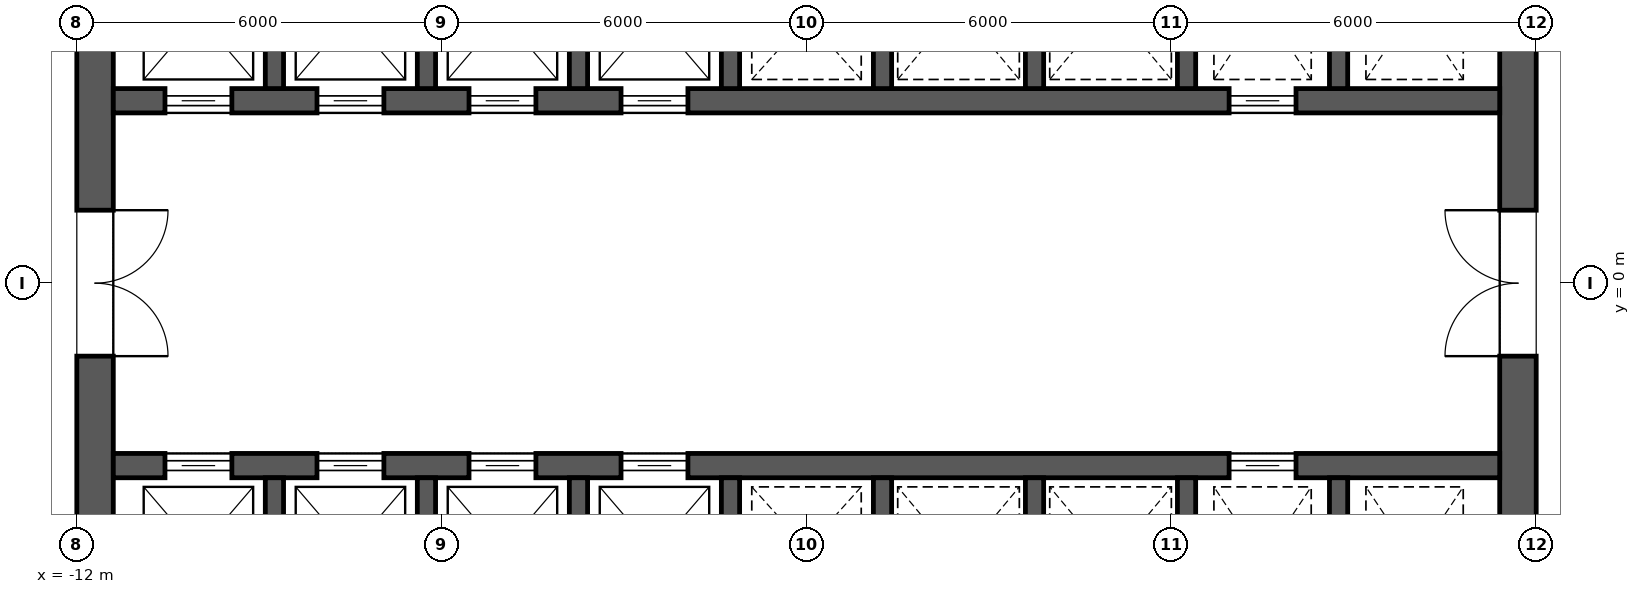
"""IFC4 building model, lengths in metres.
Left out: names, types, materials, properties, quantities, classifications, styles, units other than length and angle.
Written with IfcOpenShell. Run it as: python <this file> out.ifc"""

import sys

from ifc_helpers import new_model, si_unit, direction, frame, frame_2d, origin, place, context, subcontext, project, spatial, rectangle, extrude, element, fill, save


model = new_model("IFC4")
c1 = context("Model", 3, precision=1e-05, world=origin(), true_north=direction((0.0, 1.0)))
c2 = subcontext(c1, "Body", "Model", "MODEL_VIEW")
j1 = project(units=[si_unit("LENGTHUNIT", "METRE"), si_unit("PLANEANGLEUNIT", "RADIAN")], contexts=[c1])
p1 = place(None, origin())
s1 = spatial("IfcSite", under=j1, at=p1, CompositionType="ELEMENT")
p2 = place(p1, origin())
s2 = spatial("IfcBuilding", under=s1, at=p2, CompositionType="ELEMENT")
p3 = place(p2, frame((0.0, 0.0, 27.7)))
s3 = spatial("IfcBuildingStorey", under=s2, at=p3, CompositionType="ELEMENT", Elevation=27.7)
p4 = place(p3, frame((11.7, -11.4, 0.0), z_axis=(0.0, 0.0, 1.0), x_axis=(0.0, 1.0, 0.0)))
e1 = element("IfcWall", 1, at=p4, inside=s3, PredefinedType="SHEAR", context=c2, shape_type="SweptSolid", body=[
    extrude(rectangle(XDim=22.8, YDim=0.6, at=frame_2d((11.4, 0.0))), origin(), (0.0, 0.0, 1.0), 4.2),
])
p5 = place(p4, frame((10.2, 0.0, 0.0)))
e2 = element("IfcOpeningElement", 2, at=p5, cuts=e1, PredefinedType="OPENING", context=c2, shape_type="SweptSolid", body=[
    extrude(rectangle(XDim=2.4, YDim=2.1, at=frame_2d((1.2, 1.05))), frame((0.0, 0.312, 0.0), z_axis=(0.0, -1.0, 0.0), x_axis=(1.0, 0.0, 0.0)), (0.0, 0.0, 1.0), 0.624),
])
p6 = place(p4, frame((19.5, 0.0, 0.0)))
e3 = element("IfcOpeningElement", 3, at=p6, cuts=e1, PredefinedType="OPENING", context=c2, shape_type="SweptSolid", body=[
    extrude(rectangle(XDim=1.2, YDim=2.1, at=frame_2d((0.6, 1.05))), frame((0.0, 0.312, 0.0), z_axis=(0.0, -1.0, 0.0), x_axis=(1.0, 0.0, 0.0)), (0.0, 0.0, 1.0), 0.624),
])
p7 = place(p4, frame((2.1, 0.0, 0.0)))
e4 = element("IfcOpeningElement", 4, at=p7, cuts=e1, PredefinedType="OPENING", context=c2, shape_type="SweptSolid", body=[
    extrude(rectangle(XDim=1.2, YDim=2.1, at=frame_2d((0.6, 1.05))), frame((0.0, 0.312, 0.0), z_axis=(0.0, -1.0, 0.0), x_axis=(1.0, 0.0, 0.0)), (0.0, 0.0, 1.0), 0.624),
])
p8 = place(p3, frame((-11.7, -11.4, 0.0), z_axis=(0.0, 0.0, 1.0), x_axis=(0.0, 1.0, 0.0)))
e5 = element("IfcWall", 5, at=p8, inside=s3, PredefinedType="SHEAR", context=c2, shape_type="SweptSolid", body=[
    extrude(rectangle(XDim=22.8, YDim=0.6, at=frame_2d((11.4, 0.0))), origin(), (0.0, 0.0, 1.0), 4.2),
])
p9 = place(p8, frame((10.2, 0.0, 0.0)))
e6 = element("IfcOpeningElement", 6, at=p9, cuts=e5, PredefinedType="OPENING", context=c2, shape_type="SweptSolid", body=[
    extrude(rectangle(XDim=2.4, YDim=2.1, at=frame_2d((1.2, 1.05))), frame((0.0, 0.312, 0.0), z_axis=(0.0, -1.0, 0.0), x_axis=(1.0, 0.0, 0.0)), (0.0, 0.0, 1.0), 0.624),
])
p10 = place(p8, frame((18.925, 0.0, 0.0)))
e7 = element("IfcOpeningElement", 7, at=p10, cuts=e5, PredefinedType="OPENING", context=c2, shape_type="SweptSolid", body=[
    extrude(rectangle(XDim=1.2, YDim=2.1, at=frame_2d((0.6, 1.05))), frame((0.0, 0.312, 0.0), z_axis=(0.0, -1.0, 0.0), x_axis=(1.0, 0.0, 0.0)), (0.0, 0.0, 1.0), 0.624),
])
p11 = place(p8, frame((2.675, 0.0, 0.0)))
e8 = element("IfcOpeningElement", 8, at=p11, cuts=e5, PredefinedType="OPENING", context=c2, shape_type="SweptSolid", body=[
    extrude(rectangle(XDim=1.2, YDim=2.1, at=frame_2d((0.6, 1.05))), frame((0.0, 0.312, 0.0), z_axis=(0.0, -1.0, 0.0), x_axis=(1.0, 0.0, 0.0)), (0.0, 0.0, 1.0), 0.624),
])
p12 = place(p3, frame((-11.4, 3.0, 0.0), z_axis=(0.0, 0.0, 1.0), x_axis=(1.0, 0.0, 0.0)))
e9 = element("IfcWall", 9, at=p12, inside=s3, PredefinedType="SHEAR", context=c2, shape_type="SweptSolid", body=[
    extrude(rectangle(XDim=22.8, YDim=0.4, at=frame_2d((11.4, 0.0))), origin(), (0.0, 0.0, 1.0), 4.2),
])
p13 = place(p12, frame((0.85, 0.0, 0.0)))
e10 = element("IfcOpeningElement", 10, at=p13, cuts=e9, PredefinedType="OPENING", context=c2, shape_type="SweptSolid", body=[
    extrude(rectangle(XDim=1.1, YDim=2.1, at=frame_2d((0.55, 1.05))), frame((0.0, 0.212, 0.0), z_axis=(0.0, -1.0, 0.0), x_axis=(1.0, 0.0, 0.0)), (0.0, 0.0, 1.0), 0.424),
])
p14 = place(p12, frame((3.35, 0.0, 0.0)))
e11 = element("IfcOpeningElement", 11, at=p14, cuts=e9, PredefinedType="OPENING", context=c2, shape_type="SweptSolid", body=[
    extrude(rectangle(XDim=1.1, YDim=2.1, at=frame_2d((0.55, 1.05))), frame((0.0, 0.212, 0.0), z_axis=(0.0, -1.0, 0.0), x_axis=(1.0, 0.0, 0.0)), (0.0, 0.0, 1.0), 0.424),
])
p15 = place(p12, frame((5.85, 0.0, 0.0)))
e12 = element("IfcOpeningElement", 12, at=p15, cuts=e9, PredefinedType="OPENING", context=c2, shape_type="SweptSolid", body=[
    extrude(rectangle(XDim=1.1, YDim=2.1, at=frame_2d((0.55, 1.05))), frame((0.0, 0.212, 0.0), z_axis=(0.0, -1.0, 0.0), x_axis=(1.0, 0.0, 0.0)), (0.0, 0.0, 1.0), 0.424),
])
p16 = place(p12, frame((8.35, 0.0, 0.0)))
e13 = element("IfcOpeningElement", 13, at=p16, cuts=e9, PredefinedType="OPENING", context=c2, shape_type="SweptSolid", body=[
    extrude(rectangle(XDim=1.1, YDim=2.1, at=frame_2d((0.55, 1.05))), frame((0.0, 0.212, 0.0), z_axis=(0.0, -1.0, 0.0), x_axis=(1.0, 0.0, 0.0)), (0.0, 0.0, 1.0), 0.424),
])
p17 = place(p12, frame((18.35, 0.0, 0.0)))
e14 = element("IfcOpeningElement", 14, at=p17, cuts=e9, PredefinedType="OPENING", context=c2, shape_type="SweptSolid", body=[
    extrude(rectangle(XDim=1.1, YDim=2.1, at=frame_2d((0.55, 1.05))), frame((0.0, 0.212, 0.0), z_axis=(0.0, -1.0, 0.0), x_axis=(1.0, 0.0, 0.0)), (0.0, 0.0, 1.0), 0.424),
])
for number, where, z_axis, x_axis in (
    (15, (-8.75, 3.2, 0.0), (0.0, 0.0, 1.0), (0.0, 1.0, 0.0)),
    (16, (-6.25, 3.2, 0.0), (0.0, 0.0, 1.0), (0.0, 1.0, 0.0)),
    (17, (-3.75, 3.2, 0.0), (0.0, 0.0, 1.0), (0.0, 1.0, 0.0)),
    (18, (-1.25, 3.2, 0.0), (0.0, 0.0, 1.0), (0.0, 1.0, 0.0)),
    (19, (1.25, 3.2, 0.0), (0.0, 0.0, 1.0), (0.0, 1.0, 0.0)),
    (20, (3.75, 3.2, 0.0), (0.0, 0.0, 1.0), (0.0, 1.0, 0.0)),
    (21, (6.25, 3.2, 0.0), (0.0, 0.0, 1.0), (0.0, 1.0, 0.0)),
    (22, (8.75, 3.2, 0.0), (0.0, 0.0, 1.0), (0.0, 1.0, 0.0)),
):
    element("IfcWall", number, at=place(p3, frame(where, z_axis=z_axis, x_axis=x_axis)), inside=s3, PredefinedType="SHEAR", context=c2, shape_type="SweptSolid", body=[
        extrude(rectangle(XDim=2.9, YDim=0.3, at=frame_2d((1.45, 0.0))), origin(), (0.0, 0.0, 1.0), 4.2),
    ])
p18 = place(p3, frame((-11.4, -3.0, 0.0), z_axis=(0.0, 0.0, 1.0), x_axis=(1.0, 0.0, 0.0)))
e23 = element("IfcWall", 23, at=p18, inside=s3, PredefinedType="SHEAR", context=c2, shape_type="SweptSolid", body=[
    extrude(rectangle(XDim=22.8, YDim=0.4, at=frame_2d((11.4, 0.0))), origin(), (0.0, 0.0, 1.0), 4.2),
])
p19 = place(p18, frame((0.85, 0.0, 0.0)))
e24 = element("IfcOpeningElement", 24, at=p19, cuts=e23, PredefinedType="OPENING", context=c2, shape_type="SweptSolid", body=[
    extrude(rectangle(XDim=1.1, YDim=2.1, at=frame_2d((0.55, 1.05))), frame((0.0, 0.212, 0.0), z_axis=(0.0, -1.0, 0.0), x_axis=(1.0, 0.0, 0.0)), (0.0, 0.0, 1.0), 0.424),
])
p20 = place(p18, frame((3.35, 0.0, 0.0)))
e25 = element("IfcOpeningElement", 25, at=p20, cuts=e23, PredefinedType="OPENING", context=c2, shape_type="SweptSolid", body=[
    extrude(rectangle(XDim=1.1, YDim=2.1, at=frame_2d((0.55, 1.05))), frame((0.0, 0.212, 0.0), z_axis=(0.0, -1.0, 0.0), x_axis=(1.0, 0.0, 0.0)), (0.0, 0.0, 1.0), 0.424),
])
p21 = place(p18, frame((5.85, 0.0, 0.0)))
e26 = element("IfcOpeningElement", 26, at=p21, cuts=e23, PredefinedType="OPENING", context=c2, shape_type="SweptSolid", body=[
    extrude(rectangle(XDim=1.1, YDim=2.1, at=frame_2d((0.55, 1.05))), frame((0.0, 0.212, 0.0), z_axis=(0.0, -1.0, 0.0), x_axis=(1.0, 0.0, 0.0)), (0.0, 0.0, 1.0), 0.424),
])
p22 = place(p18, frame((8.35, 0.0, 0.0)))
e27 = element("IfcOpeningElement", 27, at=p22, cuts=e23, PredefinedType="OPENING", context=c2, shape_type="SweptSolid", body=[
    extrude(rectangle(XDim=1.1, YDim=2.1, at=frame_2d((0.55, 1.05))), frame((0.0, 0.212, 0.0), z_axis=(0.0, -1.0, 0.0), x_axis=(1.0, 0.0, 0.0)), (0.0, 0.0, 1.0), 0.424),
])
p23 = place(p18, frame((18.35, 0.0, 0.0)))
e28 = element("IfcOpeningElement", 28, at=p23, cuts=e23, PredefinedType="OPENING", context=c2, shape_type="SweptSolid", body=[
    extrude(rectangle(XDim=1.1, YDim=2.1, at=frame_2d((0.55, 1.05))), frame((0.0, 0.212, 0.0), z_axis=(0.0, -1.0, 0.0), x_axis=(1.0, 0.0, 0.0)), (0.0, 0.0, 1.0), 0.424),
])
for number, where, z_axis, x_axis in (
    (29, (-8.75, -6.1, 0.0), (0.0, 0.0, 1.0), (0.0, 1.0, 0.0)),
    (30, (-6.25, -6.1, 0.0), (0.0, 0.0, 1.0), (0.0, 1.0, 0.0)),
    (31, (-3.75, -6.1, 0.0), (0.0, 0.0, 1.0), (0.0, 1.0, 0.0)),
    (32, (-1.25, -6.1, 0.0), (0.0, 0.0, 1.0), (0.0, 1.0, 0.0)),
    (33, (1.25, -6.1, 0.0), (0.0, 0.0, 1.0), (0.0, 1.0, 0.0)),
    (34, (3.75, -6.1, 0.0), (0.0, 0.0, 1.0), (0.0, 1.0, 0.0)),
    (35, (6.25, -6.1, 0.0), (0.0, 0.0, 1.0), (0.0, 1.0, 0.0)),
    (36, (8.75, -6.1, 0.0), (0.0, 0.0, 1.0), (0.0, 1.0, 0.0)),
):
    element("IfcWall", number, at=place(p3, frame(where, z_axis=z_axis, x_axis=x_axis)), inside=s3, PredefinedType="SHEAR", context=c2, shape_type="SweptSolid", body=[
        extrude(rectangle(XDim=2.9, YDim=0.3, at=frame_2d((1.45, 0.0))), origin(), (0.0, 0.0, 1.0), 4.2),
    ])
p24 = place(p13, origin())
e37 = element("IfcDoor", 37, at=p24, inside=s3, OperationType="SLIDING_TO_LEFT", PredefinedType="DOOR", context=c2, shape_type="SweptSolid", body=[
    extrude(rectangle(XDim=1.1, YDim=2.1, at=frame_2d((0.55, 1.05))), frame((0.0, 0.025, 0.0), z_axis=(0.0, -1.0, 0.0), x_axis=(1.0, 0.0, 0.0)), (0.0, 0.0, 1.0), 0.05),
])
fill(e10, e37)
p25 = place(p14, origin())
e38 = element("IfcDoor", 38, at=p25, inside=s3, OperationType="SLIDING_TO_LEFT", PredefinedType="DOOR", context=c2, shape_type="SweptSolid", body=[
    extrude(rectangle(XDim=1.1, YDim=2.1, at=frame_2d((0.55, 1.05))), frame((0.0, 0.025, 0.0), z_axis=(0.0, -1.0, 0.0), x_axis=(1.0, 0.0, 0.0)), (0.0, 0.0, 1.0), 0.05),
])
fill(e11, e38)
p26 = place(p15, origin())
e39 = element("IfcDoor", 39, at=p26, inside=s3, OperationType="SLIDING_TO_LEFT", PredefinedType="DOOR", context=c2, shape_type="SweptSolid", body=[
    extrude(rectangle(XDim=1.1, YDim=2.1, at=frame_2d((0.55, 1.05))), frame((0.0, 0.025, 0.0), z_axis=(0.0, -1.0, 0.0), x_axis=(1.0, 0.0, 0.0)), (0.0, 0.0, 1.0), 0.05),
])
fill(e12, e39)
p27 = place(p16, origin())
e40 = element("IfcDoor", 40, at=p27, inside=s3, OperationType="SLIDING_TO_LEFT", PredefinedType="DOOR", context=c2, shape_type="SweptSolid", body=[
    extrude(rectangle(XDim=1.1, YDim=2.1, at=frame_2d((0.55, 1.05))), frame((0.0, 0.025, 0.0), z_axis=(0.0, -1.0, 0.0), x_axis=(1.0, 0.0, 0.0)), (0.0, 0.0, 1.0), 0.05),
])
fill(e13, e40)
p28 = place(p19, origin())
e41 = element("IfcDoor", 41, at=p28, inside=s3, OperationType="SLIDING_TO_LEFT", PredefinedType="DOOR", context=c2, shape_type="SweptSolid", body=[
    extrude(rectangle(XDim=1.1, YDim=2.1, at=frame_2d((0.55, 1.05))), frame((0.0, 0.025, 0.0), z_axis=(0.0, -1.0, 0.0), x_axis=(1.0, 0.0, 0.0)), (0.0, 0.0, 1.0), 0.05),
])
fill(e24, e41)
p29 = place(p20, origin())
e42 = element("IfcDoor", 42, at=p29, inside=s3, OperationType="SLIDING_TO_LEFT", PredefinedType="DOOR", context=c2, shape_type="SweptSolid", body=[
    extrude(rectangle(XDim=1.1, YDim=2.1, at=frame_2d((0.55, 1.05))), frame((0.0, 0.025, 0.0), z_axis=(0.0, -1.0, 0.0), x_axis=(1.0, 0.0, 0.0)), (0.0, 0.0, 1.0), 0.05),
])
fill(e25, e42)
p30 = place(p21, origin())
e43 = element("IfcDoor", 43, at=p30, inside=s3, OperationType="SLIDING_TO_LEFT", PredefinedType="DOOR", context=c2, shape_type="SweptSolid", body=[
    extrude(rectangle(XDim=1.1, YDim=2.1, at=frame_2d((0.55, 1.05))), frame((0.0, 0.025, 0.0), z_axis=(0.0, -1.0, 0.0), x_axis=(1.0, 0.0, 0.0)), (0.0, 0.0, 1.0), 0.05),
])
fill(e26, e43)
p31 = place(p22, origin())
e44 = element("IfcDoor", 44, at=p31, inside=s3, OperationType="SLIDING_TO_LEFT", PredefinedType="DOOR", context=c2, shape_type="SweptSolid", body=[
    extrude(rectangle(XDim=1.1, YDim=2.1, at=frame_2d((0.55, 1.05))), frame((0.0, 0.025, 0.0), z_axis=(0.0, -1.0, 0.0), x_axis=(1.0, 0.0, 0.0)), (0.0, 0.0, 1.0), 0.05),
])
fill(e27, e44)
p32 = place(p17, origin())
e45 = element("IfcDoor", 45, at=p32, inside=s3, OperationType="SLIDING_TO_LEFT", PredefinedType="DOOR", context=c2, shape_type="SweptSolid", body=[
    extrude(rectangle(XDim=1.1, YDim=2.1, at=frame_2d((0.55, 1.05))), frame((0.0, 0.025, 0.0), z_axis=(0.0, -1.0, 0.0), x_axis=(1.0, 0.0, 0.0)), (0.0, 0.0, 1.0), 0.05),
])
fill(e14, e45)
p33 = place(p23, origin())
e46 = element("IfcDoor", 46, at=p33, inside=s3, OperationType="SLIDING_TO_LEFT", PredefinedType="DOOR", context=c2, shape_type="SweptSolid", body=[
    extrude(rectangle(XDim=1.1, YDim=2.1, at=frame_2d((0.55, 1.05))), frame((0.0, 0.025, 0.0), z_axis=(0.0, -1.0, 0.0), x_axis=(1.0, 0.0, 0.0)), (0.0, 0.0, 1.0), 0.05),
])
fill(e28, e46)
p34 = place(p9, frame((2.4, 0.0, 0.0), z_axis=(0.0, 0.0, 1.0), x_axis=(-1.0, 0.0, 0.0)))
e47 = element("IfcDoor", 47, at=p34, inside=s3, OperationType="DOUBLE_DOOR_SINGLE_SWING", PredefinedType="DOOR", context=c2, shape_type="SweptSolid", body=[
    extrude(rectangle(XDim=2.4, YDim=2.1, at=frame_2d((1.2, 1.05))), frame((0.0, 0.025, 0.0), z_axis=(0.0, -1.0, 0.0), x_axis=(1.0, 0.0, 0.0)), (0.0, 0.0, 1.0), 0.05),
])
fill(e6, e47)
p35 = place(p5, origin())
e48 = element("IfcDoor", 48, at=p35, inside=s3, OperationType="DOUBLE_DOOR_SINGLE_SWING", PredefinedType="DOOR", context=c2, shape_type="SweptSolid", body=[
    extrude(rectangle(XDim=2.4, YDim=2.1, at=frame_2d((1.2, 1.05))), frame((0.0, 0.025, 0.0), z_axis=(0.0, -1.0, 0.0), x_axis=(1.0, 0.0, 0.0)), (0.0, 0.0, 1.0), 0.05),
])
fill(e2, e48)
save(model, sys.argv[1])
